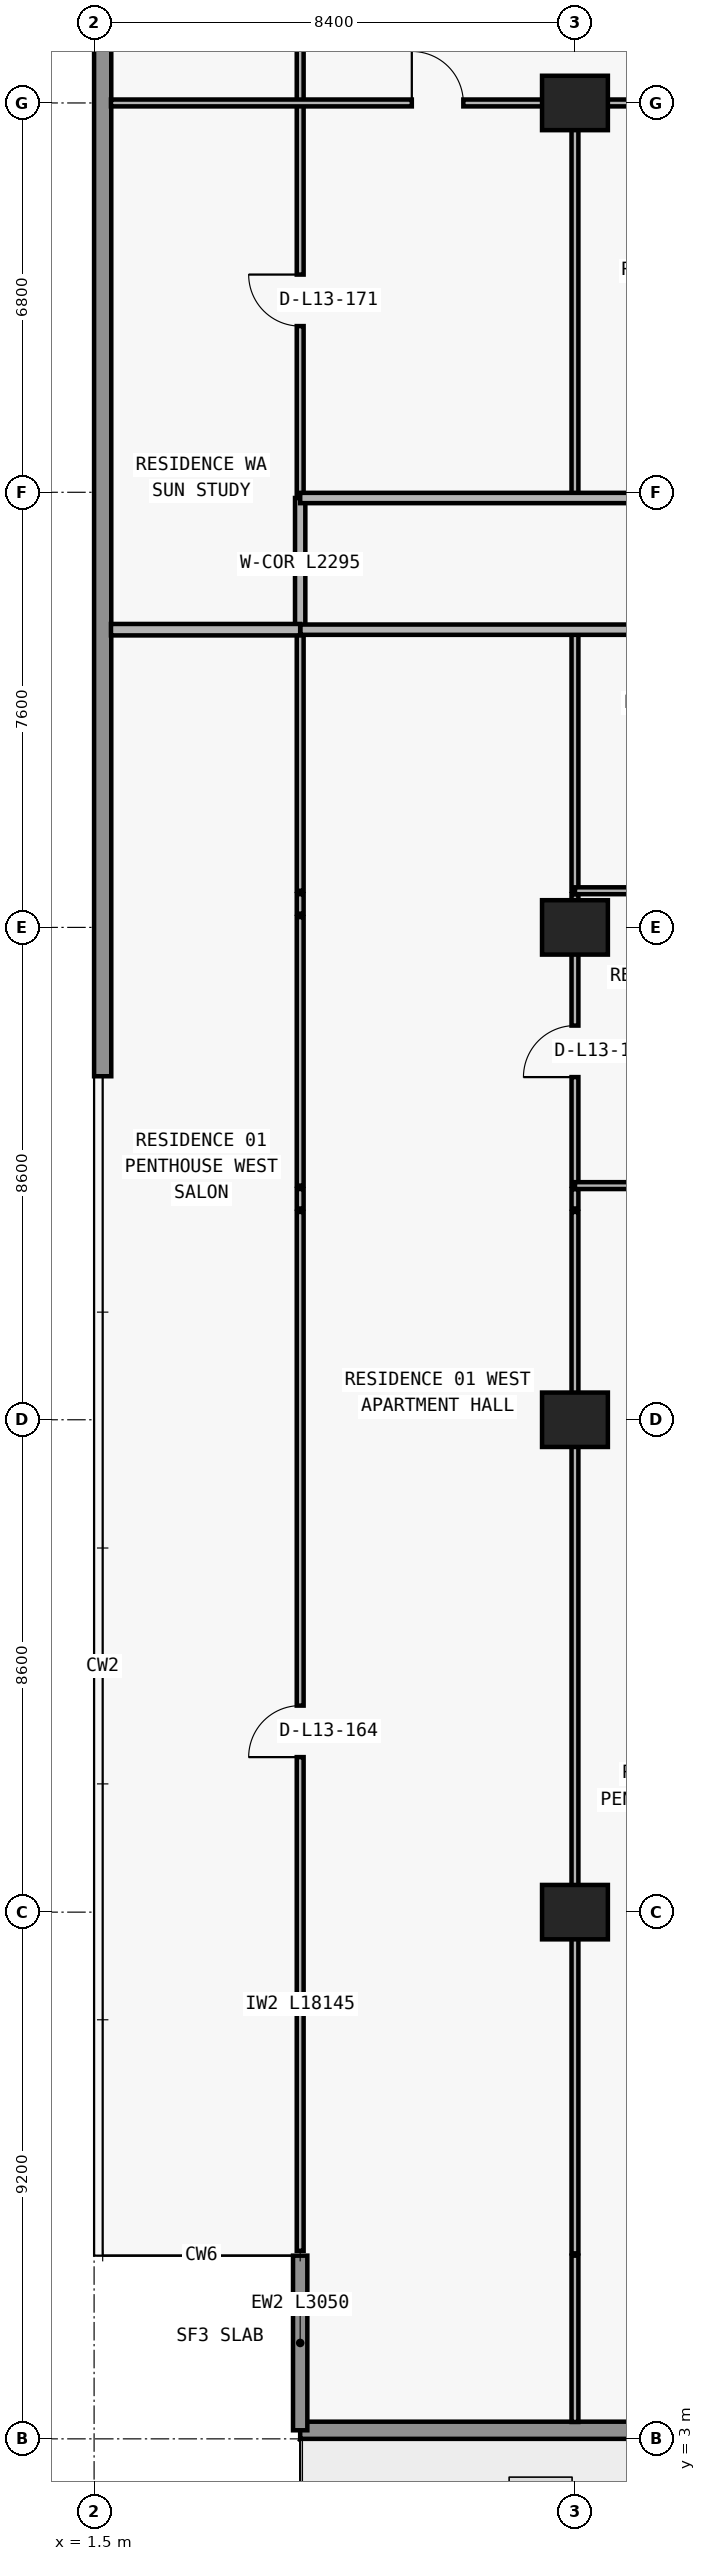
"""IFC4 building model, lengths in metres.
Left out: names, types, materials, properties, quantities, classifications, styles, units other than length and angle.
Written with IfcOpenShell. Run it as: python <this file> out.ifc"""

import sys

from ifc_helpers import new_model, si_unit, direction, frame, frame_2d, origin, origin_2d, place, context, subcontext, project, spatial, rectangle, extrude, element, fill, save


model = new_model("IFC4")
c1 = context("Model", 3, precision=1e-05, world=origin(), true_north=direction((0.0, 1.0)))
c2 = subcontext(c1, "Body", "Model", "MODEL_VIEW")
j1 = project(units=[si_unit("LENGTHUNIT", "METRE"), si_unit("PLANEANGLEUNIT", "RADIAN")], contexts=[c1])
p1 = place(None, origin())
s1 = spatial("IfcSite", under=j1, at=p1, CompositionType="ELEMENT")
p2 = place(p1, origin())
s2 = spatial("IfcBuilding", under=s1, at=p2, CompositionType="ELEMENT")
p3 = place(p2, frame((0.0, 0.0, 53.1)))
s3 = spatial("IfcBuildingStorey", under=s2, at=p3, CompositionType="ELEMENT", Elevation=53.1)
for number, where, z_axis, x_axis in (
    (1, (9.9, 12.2, 0.0), (0.0, 0.0, 1.0), (1.0, 0.0, 0.0)),
    (2, (9.9, 20.8, 0.0), (0.0, 0.0, 1.0), (1.0, 0.0, 0.0)),
    (3, (9.9, 29.4, 0.0), (0.0, 0.0, 1.0), (1.0, 0.0, 0.0)),
    (4, (9.9, 43.8, 0.0), (0.0, 0.0, 1.0), (1.0, 0.0, 0.0)),
):
    element("IfcColumn", number, at=place(p3, frame(where, z_axis=z_axis, x_axis=x_axis)), inside=s3, PredefinedType="COLUMN", context=c2, shape_type="SweptSolid", body=[
        extrude(rectangle(XDim=1.15, YDim=0.95, at=origin_2d()), origin(), (0.0, 0.0, 1.0), 3.05),
    ])
p4 = place(p3, frame((72.7, 3.15, 0.0), z_axis=(0.0, 0.0, 1.0), x_axis=(-1.0, 0.0, 0.0)))
e5 = element("IfcWall", 5, at=p4, inside=s3, PredefinedType="STANDARD", context=c2, shape_type="SweptSolid", body=[
    extrude(rectangle(XDim=67.6, YDim=0.3, at=frame_2d((33.8, 0.0))), origin(), (0.0, 0.0, 1.0), 3.05),
])
p5 = place(p4, frame((59.826, 0.0, 0.0)))
e6 = element("IfcOpeningElement", 6, at=p5, cuts=e5, PredefinedType="OPENING", context=c2, shape_type="SweptSolid", body=[
    extrude(rectangle(XDim=2.0, YDim=2.3, at=frame_2d((1.0, 1.15))), frame((0.0, 0.16, 0.0), z_axis=(0.0, -1.0, 0.0), x_axis=(1.0, 0.0, 0.0)), (0.0, 0.0, 1.0), 0.32),
])
p6 = place(p4, frame((55.526, 0.0, 0.85)))
e7 = element("IfcOpeningElement", 7, at=p6, cuts=e5, PredefinedType="OPENING", context=c2, shape_type="SweptSolid", body=[
    extrude(rectangle(XDim=2.2, YDim=1.55, at=frame_2d((1.1, 0.775))), frame((0.0, 0.16, 0.0), z_axis=(0.0, -1.0, 0.0), x_axis=(1.0, 0.0, 0.0)), (0.0, 0.0, 1.0), 0.32),
])
p7 = place(p4, frame((51.09, 0.0, 0.0)))
e8 = element("IfcOpeningElement", 8, at=p7, cuts=e5, PredefinedType="OPENING", context=c2, shape_type="SweptSolid", body=[
    extrude(rectangle(XDim=2.0, YDim=2.3, at=frame_2d((1.0, 1.15))), frame((0.0, 0.16, 0.0), z_axis=(0.0, -1.0, 0.0), x_axis=(1.0, 0.0, 0.0)), (0.0, 0.0, 1.0), 0.32),
])
p8 = place(p4, frame((46.99, 0.0, 0.85)))
e9 = element("IfcOpeningElement", 9, at=p8, cuts=e5, PredefinedType="OPENING", context=c2, shape_type="SweptSolid", body=[
    extrude(rectangle(XDim=1.8, YDim=1.55, at=frame_2d((0.9, 0.775))), frame((0.0, 0.16, 0.0), z_axis=(0.0, -1.0, 0.0), x_axis=(1.0, 0.0, 0.0)), (0.0, 0.0, 1.0), 0.32),
])
p9 = place(p4, frame((43.09, 0.0, 0.0)))
e10 = element("IfcOpeningElement", 10, at=p9, cuts=e5, PredefinedType="OPENING", context=c2, shape_type="SweptSolid", body=[
    extrude(rectangle(XDim=2.0, YDim=2.3, at=frame_2d((1.0, 1.15))), frame((0.0, 0.16, 0.0), z_axis=(0.0, -1.0, 0.0), x_axis=(1.0, 0.0, 0.0)), (0.0, 0.0, 1.0), 0.32),
])
p10 = place(p4, frame((38.41, 0.0, 0.65)))
e11 = element("IfcOpeningElement", 11, at=p10, cuts=e5, PredefinedType="OPENING", context=c2, shape_type="SweptSolid", body=[
    extrude(rectangle(XDim=2.6, YDim=1.85, at=frame_2d((1.3, 0.925))), frame((0.0, 0.16, 0.0), z_axis=(0.0, -1.0, 0.0), x_axis=(1.0, 0.0, 0.0)), (0.0, 0.0, 1.0), 0.32),
])
p11 = place(p4, frame((32.7, 0.0, 0.85)))
e12 = element("IfcOpeningElement", 12, at=p11, cuts=e5, PredefinedType="OPENING", context=c2, shape_type="SweptSolid", body=[
    extrude(rectangle(XDim=2.2, YDim=1.55, at=frame_2d((1.1, 0.775))), frame((0.0, 0.16, 0.0), z_axis=(0.0, -1.0, 0.0), x_axis=(1.0, 0.0, 0.0)), (0.0, 0.0, 1.0), 0.32),
])
p12 = place(p4, frame((24.7, 0.0, 0.85)))
e13 = element("IfcOpeningElement", 13, at=p12, cuts=e5, PredefinedType="OPENING", context=c2, shape_type="SweptSolid", body=[
    extrude(rectangle(XDim=2.2, YDim=1.55, at=frame_2d((1.1, 0.775))), frame((0.0, 0.16, 0.0), z_axis=(0.0, -1.0, 0.0), x_axis=(1.0, 0.0, 0.0)), (0.0, 0.0, 1.0), 0.32),
])
p13 = place(p4, frame((18.29, 0.0, 0.0)))
e14 = element("IfcOpeningElement", 14, at=p13, cuts=e5, PredefinedType="OPENING", context=c2, shape_type="SweptSolid", body=[
    extrude(rectangle(XDim=2.0, YDim=2.3, at=frame_2d((1.0, 1.15))), frame((0.0, 0.16, 0.0), z_axis=(0.0, -1.0, 0.0), x_axis=(1.0, 0.0, 0.0)), (0.0, 0.0, 1.0), 0.32),
])
p14 = place(p4, frame((14.19, 0.0, 0.85)))
e15 = element("IfcOpeningElement", 15, at=p14, cuts=e5, PredefinedType="OPENING", context=c2, shape_type="SweptSolid", body=[
    extrude(rectangle(XDim=1.8, YDim=1.55, at=frame_2d((0.9, 0.775))), frame((0.0, 0.16, 0.0), z_axis=(0.0, -1.0, 0.0), x_axis=(1.0, 0.0, 0.0)), (0.0, 0.0, 1.0), 0.32),
])
p15 = place(p4, frame((10.226, 0.0, 0.0)))
e16 = element("IfcOpeningElement", 16, at=p15, cuts=e5, PredefinedType="OPENING", context=c2, shape_type="SweptSolid", body=[
    extrude(rectangle(XDim=2.0, YDim=2.3, at=frame_2d((1.0, 1.15))), frame((0.0, 0.16, 0.0), z_axis=(0.0, -1.0, 0.0), x_axis=(1.0, 0.0, 0.0)), (0.0, 0.0, 1.0), 0.32),
])
p16 = place(p4, frame((5.926, 0.0, 0.85)))
e17 = element("IfcOpeningElement", 17, at=p16, cuts=e5, PredefinedType="OPENING", context=c2, shape_type="SweptSolid", body=[
    extrude(rectangle(XDim=2.2, YDim=1.55, at=frame_2d((1.1, 0.775))), frame((0.0, 0.16, 0.0), z_axis=(0.0, -1.0, 0.0), x_axis=(1.0, 0.0, 0.0)), (0.0, 0.0, 1.0), 0.32),
])
p17 = place(p3, frame((5.1, 6.2, 0.0), z_axis=(0.0, 0.0, 1.0), x_axis=(0.0, -1.0, 0.0)))
e18 = element("IfcWall", 18, at=p17, inside=s3, PredefinedType="ELEMENTEDWALL", context=c2, shape_type="SweptSolid", body=[
    extrude(rectangle(XDim=3.05, YDim=0.25, at=frame_2d((1.525, 0.0))), origin(), (0.0, 0.0, 1.0), 3.05),
])
p18 = place(p3, frame((1.65, 26.8, 0.0), z_axis=(0.0, 0.0, 1.0), x_axis=(0.0, 1.0, 0.0)))
e19 = element("IfcWall", 19, at=p18, inside=s3, PredefinedType="STANDARD", context=c2, shape_type="SweptSolid", body=[
    extrude(rectangle(XDim=20.6, YDim=0.3, at=frame_2d((10.3, 0.0))), origin(), (0.0, 0.0, 1.0), 3.05),
])
p19 = place(p3, frame((5.1, 6.285, 0.0), z_axis=(0.0, 0.0, 1.0), x_axis=(0.0, 1.0, 0.0)))
e20 = element("IfcWall", 20, at=p19, inside=s3, PredefinedType="PARTITIONING", context=c2, shape_type="SweptSolid", body=[
    extrude(rectangle(XDim=18.145, YDim=0.12, at=frame_2d((9.073, 0.0))), origin(), (0.0, 0.0, 1.0), 3.05),
])
p20 = place(p19, frame((8.623, 0.0, 0.0)))
e21 = element("IfcOpeningElement", 21, at=p20, cuts=e20, PredefinedType="OPENING", context=c2, shape_type="SweptSolid", body=[
    extrude(rectangle(XDim=0.9, YDim=2.15, at=frame_2d((0.45, 1.075))), frame((0.0, 0.07, 0.0), z_axis=(0.0, -1.0, 0.0), x_axis=(1.0, 0.0, 0.0)), (0.0, 0.0, 1.0), 0.14),
])
p21 = place(p3, frame((5.1, 24.49, 0.0), z_axis=(0.0, 0.0, 1.0), x_axis=(0.0, 1.0, 0.0)))
e22 = element("IfcWall", 22, at=p21, inside=s3, PredefinedType="PARTITIONING", context=c2, shape_type="SweptSolid", body=[
    extrude(rectangle(XDim=0.34, YDim=0.12, at=frame_2d((0.17, 0.0))), origin(), (0.0, 0.0, 1.0), 3.05),
])
p22 = place(p3, frame((5.1, 24.89, 0.0), z_axis=(0.0, 0.0, 1.0), x_axis=(0.0, 1.0, 0.0)))
e23 = element("IfcWall", 23, at=p22, inside=s3, PredefinedType="PARTITIONING", context=c2, shape_type="SweptSolid", body=[
    extrude(rectangle(XDim=4.69, YDim=0.12, at=frame_2d((2.345, 0.0))), origin(), (0.0, 0.0, 1.0), 3.05),
])
p23 = place(p3, frame((5.1, 29.64, 0.0), z_axis=(0.0, 0.0, 1.0), x_axis=(0.0, 1.0, 0.0)))
e24 = element("IfcWall", 24, at=p23, inside=s3, PredefinedType="PARTITIONING", context=c2, shape_type="SweptSolid", body=[
    extrude(rectangle(XDim=0.34, YDim=0.12, at=frame_2d((0.17, 0.0))), origin(), (0.0, 0.0, 1.0), 3.05),
])
p24 = place(p3, frame((5.1, 30.04, 0.0), z_axis=(0.0, 0.0, 1.0), x_axis=(0.0, 1.0, 0.0)))
e25 = element("IfcWall", 25, at=p24, inside=s3, PredefinedType="PARTITIONING", context=c2, shape_type="SweptSolid", body=[
    extrude(rectangle(XDim=4.56, YDim=0.12, at=frame_2d((2.28, 0.0))), origin(), (0.0, 0.0, 1.0), 3.05),
])
p25 = place(p3, frame((5.1, 34.605, 0.0), z_axis=(0.0, 0.0, 1.0), x_axis=(0.0, 1.0, 0.0)))
e26 = element("IfcWall", 26, at=p25, inside=s3, PredefinedType="PARTITIONING", context=c2, shape_type="SweptSolid", body=[
    extrude(rectangle(XDim=2.295, YDim=0.18, at=frame_2d((1.147, 0.0))), origin(), (0.0, 0.0, 1.0), 3.05),
])
p26 = place(p3, frame((5.1, 36.905, 0.0), z_axis=(0.0, 0.0, 1.0), x_axis=(0.0, 1.0, 0.0)))
e27 = element("IfcWall", 27, at=p26, inside=s3, PredefinedType="PARTITIONING", context=c2, shape_type="SweptSolid", body=[
    extrude(rectangle(XDim=10.375, YDim=0.12, at=frame_2d((5.188, 0.0))), origin(), (0.0, 0.0, 1.0), 3.05),
])
p27 = place(p26, frame((2.998, 0.0, 0.0)))
e28 = element("IfcOpeningElement", 28, at=p27, cuts=e27, PredefinedType="OPENING", context=c2, shape_type="SweptSolid", body=[
    extrude(rectangle(XDim=0.9, YDim=2.15, at=frame_2d((0.45, 1.075))), frame((0.0, 0.07, 0.0), z_axis=(0.0, -1.0, 0.0), x_axis=(1.0, 0.0, 0.0)), (0.0, 0.0, 1.0), 0.14),
])
p28 = place(p26, frame((8.185, 0.0, 0.0)))
e29 = element("IfcOpeningElement", 29, at=p28, cuts=e27, PredefinedType="OPENING", context=c2, shape_type="SweptSolid", body=[
    extrude(rectangle(XDim=0.9, YDim=2.15, at=frame_2d((0.45, 1.075))), frame((0.0, 0.07, 0.0), z_axis=(0.0, -1.0, 0.0), x_axis=(1.0, 0.0, 0.0)), (0.0, 0.0, 1.0), 0.14),
])
p29 = place(p3, frame((9.9, 3.295, 0.0), z_axis=(0.0, 0.0, 1.0), x_axis=(0.0, 1.0, 0.0)))
e30 = element("IfcWall", 30, at=p29, inside=s3, PredefinedType="PARTITIONING", context=c2, shape_type="SweptSolid", body=[
    extrude(rectangle(XDim=2.905, YDim=0.12, at=frame_2d((1.453, 0.0))), origin(), (0.0, 0.0, 1.0), 3.05),
])
p30 = place(p3, frame((9.9, 6.24, 0.0), z_axis=(0.0, 0.0, 1.0), x_axis=(0.0, 1.0, 0.0)))
e31 = element("IfcWall", 31, at=p30, inside=s3, PredefinedType="PARTITIONING", context=c2, shape_type="SweptSolid", body=[
    extrude(rectangle(XDim=18.19, YDim=0.12, at=frame_2d((9.095, 0.0))), origin(), (0.0, 0.0, 1.0), 2.11),
])
p31 = place(p3, frame((9.9, 24.49, 0.0), z_axis=(0.0, 0.0, 1.0), x_axis=(0.0, 1.0, 0.0)))
e32 = element("IfcWall", 32, at=p31, inside=s3, PredefinedType="PARTITIONING", context=c2, shape_type="SweptSolid", body=[
    extrude(rectangle(XDim=0.34, YDim=0.12, at=frame_2d((0.17, 0.0))), origin(), (0.0, 0.0, 1.0), 2.11),
])
p32 = place(p3, frame((9.9, 24.89, 0.0), z_axis=(0.0, 0.0, 1.0), x_axis=(0.0, 1.0, 0.0)))
e33 = element("IfcWall", 33, at=p32, inside=s3, PredefinedType="PARTITIONING", context=c2, shape_type="SweptSolid", body=[
    extrude(rectangle(XDim=4.69, YDim=0.12, at=frame_2d((2.345, 0.0))), origin(), (0.0, 0.0, 1.0), 2.11),
])
p33 = place(p32, frame((1.895, 0.0, 0.0)))
e34 = element("IfcOpeningElement", 34, at=p33, cuts=e33, PredefinedType="OPENING", context=c2, shape_type="SweptSolid", body=[
    extrude(rectangle(XDim=0.9, YDim=2.06, at=frame_2d((0.45, 1.03))), frame((0.0, 0.07, 0.0), z_axis=(0.0, -1.0, 0.0), x_axis=(1.0, 0.0, 0.0)), (0.0, 0.0, 1.0), 0.14),
])
p34 = place(p3, frame((9.9, 29.64, 0.0), z_axis=(0.0, 0.0, 1.0), x_axis=(0.0, 1.0, 0.0)))
e35 = element("IfcWall", 35, at=p34, inside=s3, PredefinedType="PARTITIONING", context=c2, shape_type="SweptSolid", body=[
    extrude(rectangle(XDim=0.34, YDim=0.12, at=frame_2d((0.17, 0.0))), origin(), (0.0, 0.0, 1.0), 2.11),
])
p35 = place(p3, frame((9.9, 30.04, 0.0), z_axis=(0.0, 0.0, 1.0), x_axis=(0.0, 1.0, 0.0)))
e36 = element("IfcWall", 36, at=p35, inside=s3, PredefinedType="PARTITIONING", context=c2, shape_type="SweptSolid", body=[
    extrude(rectangle(XDim=4.56, YDim=0.12, at=frame_2d((2.28, 0.0))), origin(), (0.0, 0.0, 1.0), 2.11),
])
p36 = place(p3, frame((9.9, 36.9, 0.0), z_axis=(0.0, 0.0, 1.0), x_axis=(0.0, 1.0, 0.0)))
e37 = element("IfcWall", 37, at=p36, inside=s3, PredefinedType="PARTITIONING", context=c2, shape_type="SweptSolid", body=[
    extrude(rectangle(XDim=6.9, YDim=0.12, at=frame_2d((3.45, 0.0))), origin(), (0.0, 0.0, 1.0), 2.11),
])
p37 = place(p3, frame((9.9, 24.89, 0.0), z_axis=(0.0, 0.0, 1.0), x_axis=(1.0, 0.0, 0.0)))
e38 = element("IfcWall", 38, at=p37, inside=s3, PredefinedType="PARTITIONING", context=c2, shape_type="SweptSolid", body=[
    extrude(rectangle(XDim=8.4, YDim=0.12, at=frame_2d((4.2, 0.0))), origin(), (0.0, 0.0, 1.0), 3.05),
])
p38 = place(p37, frame((1.524, 0.0, 0.0)))
e39 = element("IfcOpeningElement", 39, at=p38, cuts=e38, PredefinedType="OPENING", context=c2, shape_type="SweptSolid", body=[
    extrude(rectangle(XDim=0.9, YDim=2.15, at=frame_2d((0.45, 1.075))), frame((0.0, 0.07, 0.0), z_axis=(0.0, -1.0, 0.0), x_axis=(1.0, 0.0, 0.0)), (0.0, 0.0, 1.0), 0.14),
])
p39 = place(p37, frame((5.893, 0.0, 0.0)))
e40 = element("IfcOpeningElement", 40, at=p39, cuts=e38, PredefinedType="OPENING", context=c2, shape_type="SweptSolid", body=[
    extrude(rectangle(XDim=0.9, YDim=2.15, at=frame_2d((0.45, 1.075))), frame((0.0, 0.07, 0.0), z_axis=(0.0, -1.0, 0.0), x_axis=(1.0, 0.0, 0.0)), (0.0, 0.0, 1.0), 0.14),
])
p40 = place(p3, frame((9.9, 30.04, 0.0), z_axis=(0.0, 0.0, 1.0), x_axis=(1.0, 0.0, 0.0)))
e41 = element("IfcWall", 41, at=p40, inside=s3, PredefinedType="PARTITIONING", context=c2, shape_type="SweptSolid", body=[
    extrude(rectangle(XDim=8.4, YDim=0.12, at=frame_2d((4.2, 0.0))), origin(), (0.0, 0.0, 1.0), 3.05),
])
p41 = place(p40, frame((1.693, 0.0, 0.0)))
e42 = element("IfcOpeningElement", 42, at=p41, cuts=e41, PredefinedType="OPENING", context=c2, shape_type="SweptSolid", body=[
    extrude(rectangle(XDim=0.9, YDim=2.15, at=frame_2d((0.45, 1.075))), frame((0.0, 0.07, 0.0), z_axis=(0.0, -1.0, 0.0), x_axis=(1.0, 0.0, 0.0)), (0.0, 0.0, 1.0), 0.14),
])
p42 = place(p3, frame((1.795, 34.6, 0.0), z_axis=(0.0, 0.0, 1.0), x_axis=(1.0, 0.0, 0.0)))
e43 = element("IfcWall", 43, at=p42, inside=s3, PredefinedType="PARTITIONING", context=c2, shape_type="SweptSolid", body=[
    extrude(rectangle(XDim=3.305, YDim=0.2, at=frame_2d((1.653, 0.0))), origin(), (0.0, 0.0, 1.0), 3.05),
])
p43 = place(p3, frame((5.105, 34.6, 0.0), z_axis=(0.0, 0.0, 1.0), x_axis=(1.0, 0.0, 0.0)))
e44 = element("IfcWall", 44, at=p43, inside=s3, PredefinedType="PARTITIONING", context=c2, shape_type="SweptSolid", body=[
    extrude(rectangle(XDim=67.595, YDim=0.18, at=frame_2d((33.797, 0.0))), origin(), (0.0, 0.0, 1.0), 3.05),
])
p44 = place(p43, frame((7.365, 0.0, 0.0)))
e45 = element("IfcOpeningElement", 45, at=p44, cuts=e44, PredefinedType="OPENING", context=c2, shape_type="SweptSolid", body=[
    extrude(rectangle(XDim=1.0, YDim=2.2, at=frame_2d((0.5, 1.1))), frame((0.0, 0.1, 0.0), z_axis=(0.0, -1.0, 0.0), x_axis=(1.0, 0.0, 0.0)), (0.0, 0.0, 1.0), 0.2),
])
p45 = place(p43, frame((15.927, 0.0, 0.0)))
e46 = element("IfcOpeningElement", 46, at=p45, cuts=e44, PredefinedType="OPENING", context=c2, shape_type="SweptSolid", body=[
    extrude(rectangle(XDim=1.0, YDim=2.2, at=frame_2d((0.5, 1.1))), frame((0.0, 0.1, 0.0), z_axis=(0.0, -1.0, 0.0), x_axis=(1.0, 0.0, 0.0)), (0.0, 0.0, 1.0), 0.2),
])
p46 = place(p43, frame((24.407, 0.0, 0.0)))
e47 = element("IfcOpeningElement", 47, at=p46, cuts=e44, PredefinedType="OPENING", context=c2, shape_type="SweptSolid", body=[
    extrude(rectangle(XDim=1.0, YDim=2.2, at=frame_2d((0.5, 1.1))), frame((0.0, 0.1, 0.0), z_axis=(0.0, -1.0, 0.0), x_axis=(1.0, 0.0, 0.0)), (0.0, 0.0, 1.0), 0.2),
])
p47 = place(p43, frame((48.739, 0.0, 0.0)))
e48 = element("IfcOpeningElement", 48, at=p47, cuts=e44, PredefinedType="OPENING", context=c2, shape_type="SweptSolid", body=[
    extrude(rectangle(XDim=1.0, YDim=2.2, at=frame_2d((0.5, 1.1))), frame((0.0, 0.1, 0.0), z_axis=(0.0, -1.0, 0.0), x_axis=(1.0, 0.0, 0.0)), (0.0, 0.0, 1.0), 0.2),
])
p48 = place(p43, frame((56.98, 0.0, 0.0)))
e49 = element("IfcOpeningElement", 49, at=p48, cuts=e44, PredefinedType="OPENING", context=c2, shape_type="SweptSolid", body=[
    extrude(rectangle(XDim=1.0, YDim=2.2, at=frame_2d((0.5, 1.1))), frame((0.0, 0.1, 0.0), z_axis=(0.0, -1.0, 0.0), x_axis=(1.0, 0.0, 0.0)), (0.0, 0.0, 1.0), 0.2),
])
p49 = place(p3, frame((5.1, 36.9, 0.0), z_axis=(0.0, 0.0, 1.0), x_axis=(1.0, 0.0, 0.0)))
e50 = element("IfcWall", 50, at=p49, inside=s3, PredefinedType="PARTITIONING", context=c2, shape_type="SweptSolid", body=[
    extrude(rectangle(XDim=12.645, YDim=0.18, at=frame_2d((6.323, 0.0))), origin(), (0.0, 0.0, 1.0), 3.05),
])
p50 = place(p49, frame((7.125, 0.0, 0.0)))
e51 = element("IfcOpeningElement", 51, at=p50, cuts=e50, PredefinedType="OPENING", context=c2, shape_type="SweptSolid", body=[
    extrude(rectangle(XDim=1.0, YDim=2.2, at=frame_2d((0.5, 1.1))), frame((0.0, 0.1, 0.0), z_axis=(0.0, -1.0, 0.0), x_axis=(1.0, 0.0, 0.0)), (0.0, 0.0, 1.0), 0.2),
])
p51 = place(p3, frame((1.795, 43.8, 0.0), z_axis=(0.0, 0.0, 1.0), x_axis=(1.0, 0.0, 0.0)))
e52 = element("IfcWall", 52, at=p51, inside=s3, PredefinedType="PARTITIONING", context=c2, shape_type="SweptSolid", body=[
    extrude(rectangle(XDim=15.96, YDim=0.12, at=frame_2d((7.98, 0.0))), origin(), (0.0, 0.0, 1.0), 2.339),
])
p52 = place(p51, frame((5.255, 0.0, 0.0)))
e53 = element("IfcOpeningElement", 53, at=p52, cuts=e52, PredefinedType="OPENING", context=c2, shape_type="SweptSolid", body=[
    extrude(rectangle(XDim=0.9, YDim=2.15, at=frame_2d((0.45, 1.075))), frame((0.0, 0.07, 0.0), z_axis=(0.0, -1.0, 0.0), x_axis=(1.0, 0.0, 0.0)), (0.0, 0.0, 1.0), 0.14),
])
p53 = place(p51, frame((10.48, 0.0, 0.0)))
e54 = element("IfcOpeningElement", 54, at=p53, cuts=e52, PredefinedType="OPENING", context=c2, shape_type="SweptSolid", body=[
    extrude(rectangle(XDim=0.9, YDim=2.15, at=frame_2d((0.45, 1.075))), frame((0.0, 0.07, 0.0), z_axis=(0.0, -1.0, 0.0), x_axis=(1.0, 0.0, 0.0)), (0.0, 0.0, 1.0), 0.14),
])
p54 = place(p51, frame((14.433, 0.0, 0.0)))
e55 = element("IfcOpeningElement", 55, at=p54, cuts=e52, PredefinedType="OPENING", context=c2, shape_type="SweptSolid", body=[
    extrude(rectangle(XDim=0.85, YDim=2.1, at=frame_2d((0.425, 1.05))), frame((0.0, 0.07, 0.0), z_axis=(0.0, -1.0, 0.0), x_axis=(1.0, 0.0, 0.0)), (0.0, 0.0, 1.0), 0.14),
])
p55 = place(p33, origin())
e56 = element("IfcDoor", 56, at=p55, inside=s3, OperationType="SINGLE_SWING_LEFT", PredefinedType="DOOR", context=c2, shape_type="SweptSolid", body=[
    extrude(rectangle(XDim=0.9, YDim=2.06, at=frame_2d((0.45, 1.03))), frame((0.0, 0.025, 0.0), z_axis=(0.0, -1.0, 0.0), x_axis=(1.0, 0.0, 0.0)), (0.0, 0.0, 1.0), 0.05),
])
fill(e34, e56)
p56 = place(p20, origin())
e57 = element("IfcDoor", 57, at=p56, inside=s3, OperationType="SINGLE_SWING_LEFT", PredefinedType="DOOR", context=c2, shape_type="SweptSolid", body=[
    extrude(rectangle(XDim=0.9, YDim=2.15, at=frame_2d((0.45, 1.075))), frame((0.0, 0.025, 0.0), z_axis=(0.0, -1.0, 0.0), x_axis=(1.0, 0.0, 0.0)), (0.0, 0.0, 1.0), 0.05),
])
fill(e21, e57)
p57 = place(p52, origin())
e58 = element("IfcDoor", 58, at=p57, inside=s3, OperationType="SINGLE_SWING_LEFT", PredefinedType="DOOR", context=c2, shape_type="SweptSolid", body=[
    extrude(rectangle(XDim=0.9, YDim=2.15, at=frame_2d((0.45, 1.075))), frame((0.0, 0.025, 0.0), z_axis=(0.0, -1.0, 0.0), x_axis=(1.0, 0.0, 0.0)), (0.0, 0.0, 1.0), 0.05),
])
fill(e53, e58)
p58 = place(p27, origin())
e59 = element("IfcDoor", 59, at=p58, inside=s3, OperationType="SINGLE_SWING_RIGHT", PredefinedType="DOOR", context=c2, shape_type="SweptSolid", body=[
    extrude(rectangle(XDim=0.9, YDim=2.15, at=frame_2d((0.45, 1.075))), frame((0.0, 0.025, 0.0), z_axis=(0.0, -1.0, 0.0), x_axis=(1.0, 0.0, 0.0)), (0.0, 0.0, 1.0), 0.05),
])
fill(e28, e59)
save(model, sys.argv[1])
